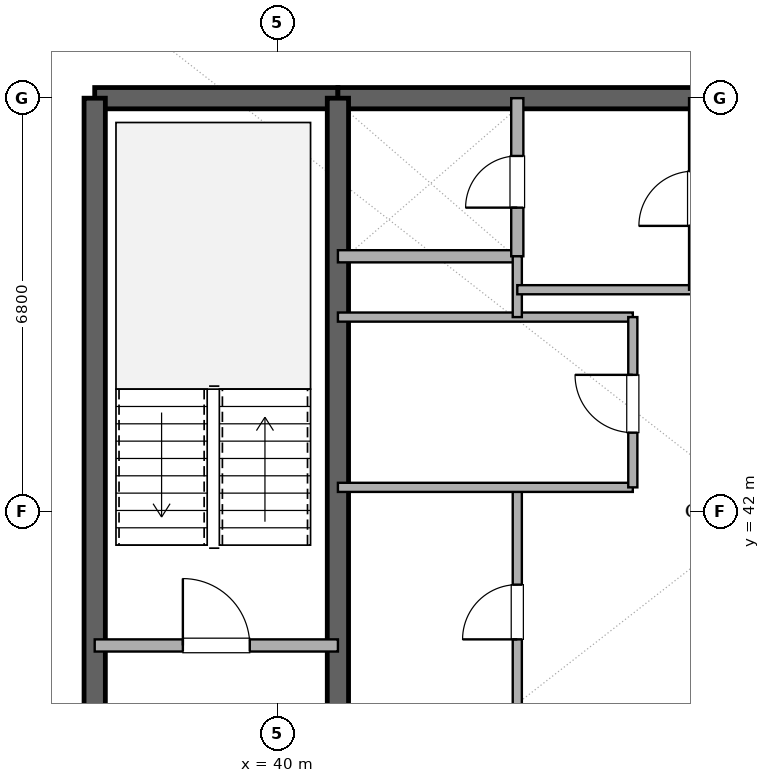
"""IFC4 building model, lengths in metres.
Left out: names, types, materials, properties, quantities, classifications, styles, units other than length and angle.
Written with IfcOpenShell. Run it as: python <this file> out.ifc"""

import sys

from ifc_helpers import new_model, si_unit, direction, frame, frame_2d, origin, place, context, subcontext, project, spatial, rectangle, extrude, element, fill, save


model = new_model("IFC4")
c1 = context("Model", 3, precision=1e-05, world=origin(), true_north=direction((0.0, 1.0)))
c2 = subcontext(c1, "Body", "Model", "MODEL_VIEW")
j1 = project(units=[si_unit("LENGTHUNIT", "METRE"), si_unit("PLANEANGLEUNIT", "RADIAN")], contexts=[c1])
p1 = place(None, origin())
s1 = spatial("IfcSite", under=j1, at=p1, CompositionType="ELEMENT")
p2 = place(p1, origin())
s2 = spatial("IfcBuilding", under=s1, at=p2, CompositionType="ELEMENT")
p3 = place(p2, frame((0.0, 0.0, 301.8)))
s3 = spatial("IfcBuildingStorey", under=s2, at=p3, CompositionType="ELEMENT", Elevation=301.8)
p4 = place(p3, frame((37.0, 48.8, 0.0), z_axis=(0.0, 0.0, 1.0), x_axis=(1.0, 0.0, 0.0)))
e1 = element("IfcWall", 1, at=p4, inside=s3, PredefinedType="SHEAR", context=c2, shape_type="SweptSolid", body=[
    extrude(rectangle(XDim=4.0, YDim=0.35, at=frame_2d((2.0, 0.0))), origin(), (0.0, 0.0, 1.0), 3.37),
])
p5 = place(p3, frame((41.0, 48.8, 0.0), z_axis=(0.0, 0.0, 1.0), x_axis=(1.0, 0.0, 0.0)))
e2 = element("IfcWall", 2, at=p5, inside=s3, PredefinedType="SHEAR", context=c2, shape_type="SweptSolid", body=[
    extrude(rectangle(XDim=14.0, YDim=0.35, at=frame_2d((7.0, 0.0))), origin(), (0.0, 0.0, 1.0), 3.37),
])
p6 = place(p5, frame((6.1, 0.0, 0.0)))
e3 = element("IfcOpeningElement", 3, at=p6, cuts=e2, PredefinedType="OPENING", context=c2, shape_type="SweptSolid", body=[
    extrude(rectangle(XDim=1.8, YDim=2.25, at=frame_2d((0.9, 1.125))), frame((0.0, 0.185, 0.0), z_axis=(0.0, -1.0, 0.0), x_axis=(1.0, 0.0, 0.0)), (0.0, 0.0, 1.0), 0.37),
])
p7 = place(p3, frame((37.0, 35.2, 0.0), z_axis=(0.0, 0.0, 1.0), x_axis=(0.0, 1.0, 0.0)))
e4 = element("IfcWall", 4, at=p7, inside=s3, PredefinedType="SHEAR", context=c2, shape_type="SweptSolid", body=[
    extrude(rectangle(XDim=13.6, YDim=0.35, at=frame_2d((6.8, 0.0))), origin(), (0.0, 0.0, 1.0), 3.37),
])
p8 = place(p7, frame((1.5, 0.0, 0.0)))
e5 = element("IfcOpeningElement", 5, at=p8, cuts=e4, PredefinedType="OPENING", context=c2, shape_type="SweptSolid", body=[
    extrude(rectangle(XDim=1.2, YDim=2.15, at=frame_2d((0.6, 1.075))), frame((0.0, 0.185, 0.0), z_axis=(0.0, -1.0, 0.0), x_axis=(1.0, 0.0, 0.0)), (0.0, 0.0, 1.0), 0.37),
])
p9 = place(p3, frame((41.0, 35.2, 0.0), z_axis=(0.0, 0.0, 1.0), x_axis=(0.0, 1.0, 0.0)))
e6 = element("IfcWall", 6, at=p9, inside=s3, PredefinedType="SHEAR", context=c2, shape_type="SweptSolid", body=[
    extrude(rectangle(XDim=13.6, YDim=0.35, at=frame_2d((6.8, 0.0))), origin(), (0.0, 0.0, 1.0), 3.37),
])
p10 = place(p9, frame((1.15, 0.0, 0.0)))
e7 = element("IfcOpeningElement", 7, at=p10, cuts=e6, PredefinedType="OPENING", context=c2, shape_type="SweptSolid", body=[
    extrude(rectangle(XDim=1.1, YDim=2.2, at=frame_2d((0.55, 1.1))), frame((0.0, 0.185, 0.0), z_axis=(0.0, -1.0, 0.0), x_axis=(1.0, 0.0, 0.0)), (0.0, 0.0, 1.0), 0.37),
])
p11 = place(p3, frame((37.0, 39.8, 0.0), z_axis=(0.0, 0.0, 1.0), x_axis=(1.0, 0.0, 0.0)))
e8 = element("IfcWall", 8, at=p11, inside=s3, PredefinedType="SOLIDWALL", context=c2, shape_type="SweptSolid", body=[
    extrude(rectangle(XDim=4.0, YDim=0.2, at=frame_2d((2.0, 0.0))), origin(), (0.0, 0.0, 1.0), 2.73),
])
p12 = place(p11, frame((1.45, 0.0, 0.0)))
e9 = element("IfcOpeningElement", 9, at=p12, cuts=e8, PredefinedType="OPENING", context=c2, shape_type="SweptSolid", body=[
    extrude(rectangle(XDim=1.1, YDim=2.15, at=frame_2d((0.55, 1.075))), frame((0.0, 0.11, 0.0), z_axis=(0.0, -1.0, 0.0), x_axis=(1.0, 0.0, 0.0)), (0.0, 0.0, 1.0), 0.22),
])
p13 = place(p3, frame((41.0, 46.2, 0.0), z_axis=(0.0, 0.0, 1.0), x_axis=(1.0, 0.0, 0.0)))
e10 = element("IfcWall", 10, at=p13, inside=s3, PredefinedType="SOLIDWALL", context=c2, shape_type="SweptSolid", body=[
    extrude(rectangle(XDim=2.95, YDim=0.2, at=frame_2d((1.475, 0.0))), origin(), (0.0, 0.0, 1.0), 2.73),
])
p14 = place(p3, frame((43.95, 46.2, 0.0), z_axis=(0.0, 0.0, 1.0), x_axis=(0.0, 1.0, 0.0)))
e11 = element("IfcWall", 11, at=p14, inside=s3, PredefinedType="SOLIDWALL", context=c2, shape_type="SweptSolid", body=[
    extrude(rectangle(XDim=2.6, YDim=0.2, at=frame_2d((1.3, 0.0))), origin(), (0.0, 0.0, 1.0), 2.73),
])
p15 = place(p14, frame((0.8, 0.0, 0.0)))
e12 = element("IfcOpeningElement", 12, at=p15, cuts=e11, PredefinedType="OPENING", context=c2, shape_type="SweptSolid", body=[
    extrude(rectangle(XDim=0.85, YDim=2.15, at=frame_2d((0.425, 1.075))), frame((0.0, 0.11, 0.0), z_axis=(0.0, -1.0, 0.0), x_axis=(1.0, 0.0, 0.0)), (0.0, 0.0, 1.0), 0.22),
])
p16 = place(p3, frame((43.95, 38.4, 0.0), z_axis=(0.0, 0.0, 1.0), x_axis=(0.0, 1.0, 0.0)))
e13 = element("IfcWall", 13, at=p16, inside=s3, PredefinedType="PARTITIONING", context=c2, shape_type="SweptSolid", body=[
    extrude(rectangle(XDim=4.0, YDim=0.15, at=frame_2d((2.0, 0.0))), origin(), (0.0, 0.0, 1.0), 2.73),
])
p17 = place(p16, frame((1.5, 0.0, 0.0)))
e14 = element("IfcOpeningElement", 14, at=p17, cuts=e13, PredefinedType="OPENING", context=c2, shape_type="SweptSolid", body=[
    extrude(rectangle(XDim=0.9, YDim=2.15, at=frame_2d((0.45, 1.075))), frame((0.0, 0.085, 0.0), z_axis=(0.0, -1.0, 0.0), x_axis=(1.0, 0.0, 0.0)), (0.0, 0.0, 1.0), 0.17),
])
for number, where, z_axis, x_axis in (
    (15, (41.0, 42.4, 0.0), (0.0, 0.0, 1.0), (1.0, 0.0, 0.0)),
    (16, (41.0, 45.2, 0.0), (0.0, 0.0, 1.0), (1.0, 0.0, 0.0)),
):
    element("IfcWall", number, at=place(p3, frame(where, z_axis=z_axis, x_axis=x_axis)), inside=s3, PredefinedType="PARTITIONING", context=c2, shape_type="SweptSolid", body=[
        extrude(rectangle(XDim=4.85, YDim=0.15, at=frame_2d((2.425, 0.0))), origin(), (0.0, 0.0, 1.0), 2.73),
    ])
p18 = place(p3, frame((43.95, 45.2, 0.0), z_axis=(0.0, 0.0, 1.0), x_axis=(0.0, 1.0, 0.0)))
e17 = element("IfcWall", 17, at=p18, inside=s3, PredefinedType="PARTITIONING", context=c2, shape_type="SweptSolid", body=[
    extrude(rectangle(XDim=1.0, YDim=0.15, at=frame_2d((0.5, 0.0))), origin(), (0.0, 0.0, 1.0), 2.73),
])
p19 = place(p3, frame((45.85, 42.4, 0.0), z_axis=(0.0, 0.0, 1.0), x_axis=(0.0, 1.0, 0.0)))
e18 = element("IfcWall", 18, at=p19, inside=s3, PredefinedType="PARTITIONING", context=c2, shape_type="SweptSolid", body=[
    extrude(rectangle(XDim=2.8, YDim=0.15, at=frame_2d((1.4, 0.0))), origin(), (0.0, 0.0, 1.0), 2.73),
])
p20 = place(p19, frame((0.9, 0.0, 0.0)))
e19 = element("IfcOpeningElement", 19, at=p20, cuts=e18, PredefinedType="OPENING", context=c2, shape_type="SweptSolid", body=[
    extrude(rectangle(XDim=0.95, YDim=2.15, at=frame_2d((0.475, 1.075))), frame((0.0, 0.085, 0.0), z_axis=(0.0, -1.0, 0.0), x_axis=(1.0, 0.0, 0.0)), (0.0, 0.0, 1.0), 0.17),
])
p21 = place(p3, frame((43.95, 45.65, 0.0), z_axis=(0.0, 0.0, 1.0), x_axis=(1.0, 0.0, 0.0)))
e20 = element("IfcWall", 20, at=p21, inside=s3, PredefinedType="PARTITIONING", context=c2, shape_type="SweptSolid", body=[
    extrude(rectangle(XDim=2.9, YDim=0.15, at=frame_2d((1.45, 0.0))), origin(), (0.0, 0.0, 1.0), 2.73),
])
p22 = place(p3, frame((46.85, 45.65, 0.0), z_axis=(0.0, 0.0, 1.0), x_axis=(0.0, 1.0, 0.0)))
e21 = element("IfcWall", 21, at=p22, inside=s3, PredefinedType="PARTITIONING", context=c2, shape_type="SweptSolid", body=[
    extrude(rectangle(XDim=3.15, YDim=0.15, at=frame_2d((1.575, 0.0))), origin(), (0.0, 0.0, 1.0), 2.73),
])
p23 = place(p22, frame((1.05, 0.0, 0.0)))
e22 = element("IfcOpeningElement", 22, at=p23, cuts=e21, PredefinedType="OPENING", context=c2, shape_type="SweptSolid", body=[
    extrude(rectangle(XDim=0.9, YDim=2.15, at=frame_2d((0.45, 1.075))), frame((0.0, 0.085, 0.0), z_axis=(0.0, -1.0, 0.0), x_axis=(1.0, 0.0, 0.0)), (0.0, 0.0, 1.0), 0.17),
])
p24 = place(p12, origin())
e23 = element("IfcDoor", 23, at=p24, inside=s3, OperationType="SINGLE_SWING_LEFT", PredefinedType="DOOR", context=c2, shape_type="SweptSolid", body=[
    extrude(rectangle(XDim=1.1, YDim=2.15, at=frame_2d((0.55, 1.075))), frame((0.0, 0.025, 0.0), z_axis=(0.0, -1.0, 0.0), x_axis=(1.0, 0.0, 0.0)), (0.0, 0.0, 1.0), 0.05),
])
fill(e9, e23)
p25 = place(p15, origin())
e24 = element("IfcDoor", 24, at=p25, inside=s3, OperationType="SINGLE_SWING_LEFT", PredefinedType="DOOR", context=c2, shape_type="SweptSolid", body=[
    extrude(rectangle(XDim=0.85, YDim=2.15, at=frame_2d((0.425, 1.075))), frame((0.0, 0.025, 0.0), z_axis=(0.0, -1.0, 0.0), x_axis=(1.0, 0.0, 0.0)), (0.0, 0.0, 1.0), 0.05),
])
fill(e12, e24)
p26 = place(p17, origin())
e25 = element("IfcDoor", 25, at=p26, inside=s3, OperationType="SINGLE_SWING_LEFT", PredefinedType="DOOR", context=c2, shape_type="SweptSolid", body=[
    extrude(rectangle(XDim=0.9, YDim=2.15, at=frame_2d((0.45, 1.075))), frame((0.0, 0.025, 0.0), z_axis=(0.0, -1.0, 0.0), x_axis=(1.0, 0.0, 0.0)), (0.0, 0.0, 1.0), 0.05),
])
fill(e14, e25)
p27 = place(p20, origin())
e26 = element("IfcDoor", 26, at=p27, inside=s3, OperationType="SINGLE_SWING_RIGHT", PredefinedType="DOOR", context=c2, shape_type="SweptSolid", body=[
    extrude(rectangle(XDim=0.95, YDim=2.15, at=frame_2d((0.475, 1.075))), frame((0.0, 0.025, 0.0), z_axis=(0.0, -1.0, 0.0), x_axis=(1.0, 0.0, 0.0)), (0.0, 0.0, 1.0), 0.05),
])
fill(e19, e26)
save(model, sys.argv[1])
